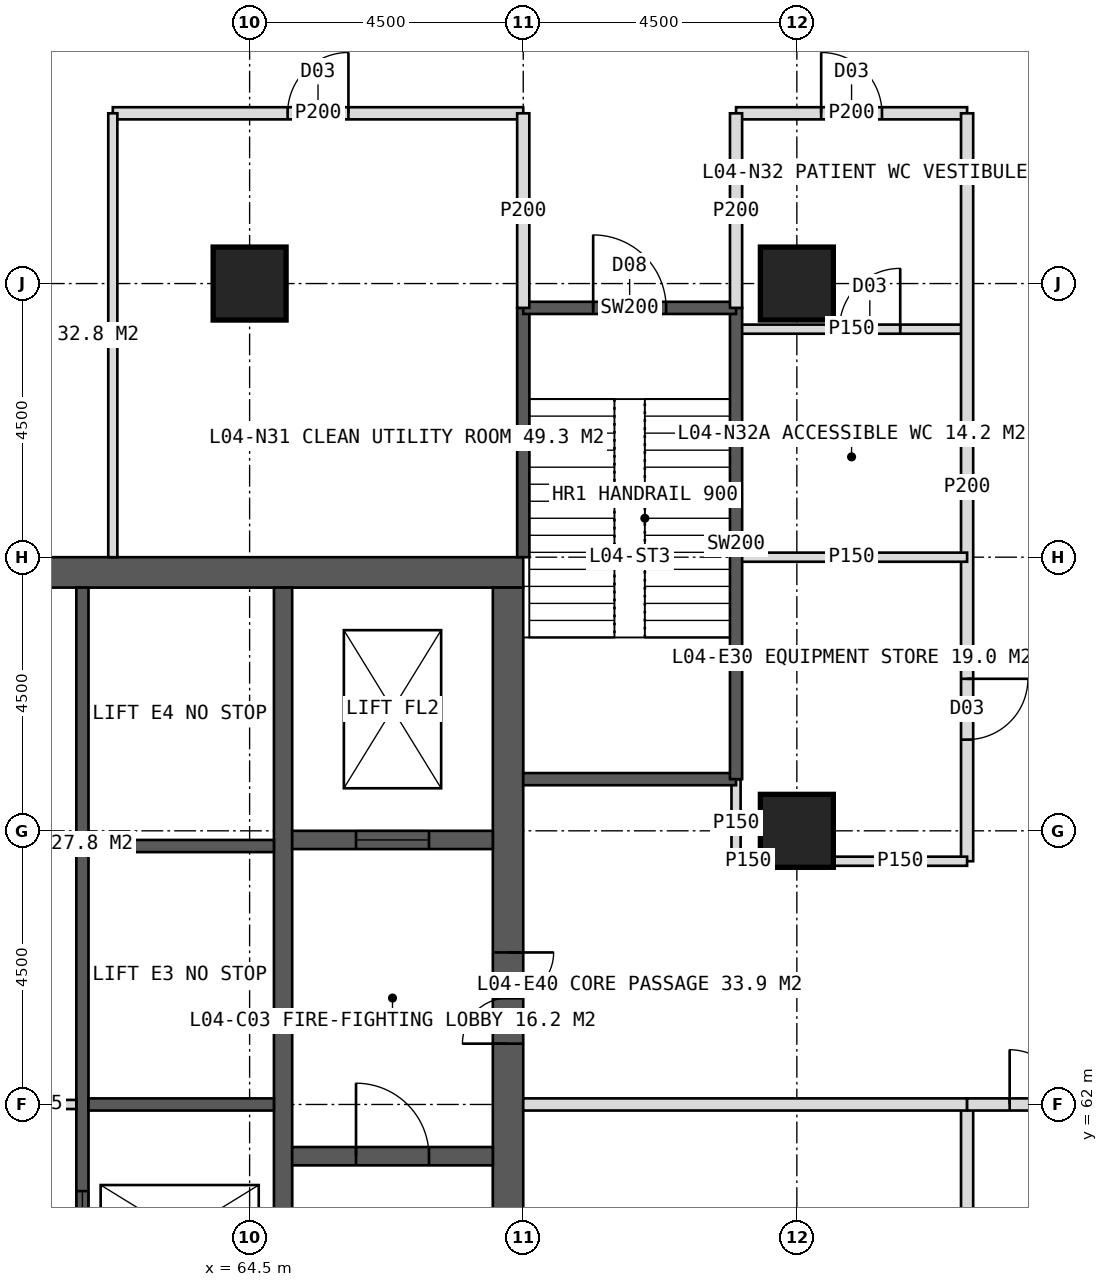
"""IFC4 building model, lengths in metres.
Left out: names, types, materials, properties, quantities, classifications, styles, units other than length and angle.
Written with IfcOpenShell. Run it as: python <this file> out.ifc"""

import sys

from ifc_helpers import new_model, si_unit, direction, frame, frame_2d, origin, origin_2d, place, context, subcontext, project, spatial, rectangle, hollow_rectangle, extrude, element, fill, save


model = new_model("IFC4")
c1 = context("Model", 3, precision=1e-05, world=origin(), true_north=direction((0.0, 1.0)))
c2 = subcontext(c1, "Body", "Model", "MODEL_VIEW")
j1 = project(units=[si_unit("LENGTHUNIT", "METRE"), si_unit("PLANEANGLEUNIT", "RADIAN")], contexts=[c1])
p1 = place(None, origin())
s1 = spatial("IfcSite", under=j1, at=p1, CompositionType="ELEMENT")
p2 = place(p1, origin())
s2 = spatial("IfcBuilding", under=s1, at=p2, CompositionType="ELEMENT")
p3 = place(p2, frame((0.0, 0.0, 21.0)))
s3 = spatial("IfcBuildingStorey", under=s2, at=p3, CompositionType="ELEMENT", Elevation=21.0)
p4 = place(p3, frame((51.0, 70.75, 0.0), z_axis=(0.0, 0.0, 1.0), x_axis=(1.0, 0.0, 0.0)))
e1 = element("IfcWall", 1, at=p4, inside=s3, PredefinedType="SHEAR", context=c2, shape_type="SweptSolid", body=[
    extrude(rectangle(XDim=18.0, YDim=0.5, at=frame_2d((9.0, 0.0))), origin(), (0.0, 0.0, 1.0), 5.0),
])
p5 = place(p4, frame((8.1, 0.0, 0.0)))
e2 = element("IfcOpeningElement", 2, at=p5, cuts=e1, PredefinedType="OPENING", context=c2, shape_type="SweptSolid", body=[
    extrude(rectangle(XDim=1.8, YDim=2.2, at=frame_2d((0.9, 1.1))), frame((0.0, 0.26, 0.0), z_axis=(0.0, -1.0, 0.0), x_axis=(1.0, 0.0, 0.0)), (0.0, 0.0, 1.0), 0.52),
])
p6 = place(p3, frame((68.75, 53.5, 0.0), z_axis=(0.0, 0.0, 1.0), x_axis=(0.0, 1.0, 0.0)))
e3 = element("IfcWall", 3, at=p6, inside=s3, PredefinedType="SHEAR", context=c2, shape_type="SweptSolid", body=[
    extrude(rectangle(XDim=17.0, YDim=0.5, at=frame_2d((8.5, 0.0))), origin(), (0.0, 0.0, 1.0), 5.0),
])
p7 = place(p6, frame((9.5, 0.0, 0.0)))
e4 = element("IfcOpeningElement", 4, at=p7, cuts=e3, PredefinedType="OPENING", context=c2, shape_type="SweptSolid", body=[
    extrude(rectangle(XDim=1.5, YDim=2.2, at=frame_2d((0.75, 1.1))), frame((0.0, 0.26, 0.0), z_axis=(0.0, -1.0, 0.0), x_axis=(1.0, 0.0, 0.0)), (0.0, 0.0, 1.0), 0.52),
])
p8 = place(p3, frame((65.05, 53.5, 0.0), z_axis=(0.0, 0.0, 1.0), x_axis=(0.0, 1.0, 0.0)))
e5 = element("IfcWall", 5, at=p8, inside=s3, PredefinedType="SHEAR", context=c2, shape_type="SweptSolid", body=[
    extrude(rectangle(XDim=17.0, YDim=0.3, at=frame_2d((8.5, 0.0))), origin(), (0.0, 0.0, 1.0), 5.0),
])
p9 = place(p3, frame((61.75, 53.5, 0.0), z_axis=(0.0, 0.0, 1.0), x_axis=(0.0, 1.0, 0.0)))
e6 = element("IfcWall", 6, at=p9, inside=s3, PredefinedType="SHEAR", context=c2, shape_type="SweptSolid", body=[
    extrude(rectangle(XDim=17.0, YDim=0.2, at=frame_2d((8.5, 0.0))), origin(), (0.0, 0.0, 1.0), 5.0),
])
p10 = place(p9, frame((1.375, 0.0, 0.0)))
e7 = element("IfcOpeningElement", 7, at=p10, cuts=e6, PredefinedType="OPENING", context=c2, shape_type="SweptSolid", body=[
    extrude(rectangle(XDim=1.4, YDim=2.2, at=frame_2d((0.7, 1.1))), frame((0.0, 0.11, 0.0), z_axis=(0.0, -1.0, 0.0), x_axis=(1.0, 0.0, 0.0)), (0.0, 0.0, 1.0), 0.22),
])
p11 = place(p9, frame((5.675, 0.0, 0.0)))
e8 = element("IfcOpeningElement", 8, at=p11, cuts=e6, PredefinedType="OPENING", context=c2, shape_type="SweptSolid", body=[
    extrude(rectangle(XDim=1.4, YDim=2.2, at=frame_2d((0.7, 1.1))), frame((0.0, 0.11, 0.0), z_axis=(0.0, -1.0, 0.0), x_axis=(1.0, 0.0, 0.0)), (0.0, 0.0, 1.0), 0.22),
])
for number, where, z_axis, x_axis in (
    (9, (61.85, 62.0, 0.0), (0.0, 0.0, 1.0), (1.0, 0.0, 0.0)),
    (10, (61.85, 66.25, 0.0), (0.0, 0.0, 1.0), (1.0, 0.0, 0.0)),
):
    element("IfcWall", number, at=place(p3, frame(where, z_axis=z_axis, x_axis=x_axis)), inside=s3, PredefinedType="SHEAR", context=c2, shape_type="SweptSolid", body=[
        extrude(rectangle(XDim=3.05, YDim=0.2, at=frame_2d((1.525, 0.0))), origin(), (0.0, 0.0, 1.0), 5.0),
    ])
p12 = place(p3, frame((65.2, 61.15, 0.0), z_axis=(0.0, 0.0, 1.0), x_axis=(1.0, 0.0, 0.0)))
e11 = element("IfcWall", 11, at=p12, inside=s3, PredefinedType="SHEAR", context=c2, shape_type="SweptSolid", body=[
    extrude(rectangle(XDim=3.3, YDim=0.3, at=frame_2d((1.65, 0.0))), origin(), (0.0, 0.0, 1.0), 5.0),
])
p13 = place(p12, frame((1.05, 0.0, 0.0)))
e12 = element("IfcOpeningElement", 12, at=p13, cuts=e11, PredefinedType="OPENING", context=c2, shape_type="SweptSolid", body=[
    extrude(rectangle(XDim=1.2, YDim=2.1, at=frame_2d((0.6, 1.05))), frame((0.0, 0.16, 0.0), z_axis=(0.0, -1.0, 0.0), x_axis=(1.0, 0.0, 0.0)), (0.0, 0.0, 1.0), 0.32),
])
p14 = place(p3, frame((65.2, 66.35, 0.0), z_axis=(0.0, 0.0, 1.0), x_axis=(1.0, 0.0, 0.0)))
e13 = element("IfcWall", 13, at=p14, inside=s3, PredefinedType="SHEAR", context=c2, shape_type="SweptSolid", body=[
    extrude(rectangle(XDim=3.3, YDim=0.3, at=frame_2d((1.65, 0.0))), origin(), (0.0, 0.0, 1.0), 5.0),
])
p15 = place(p14, frame((1.05, 0.0, 0.0)))
e14 = element("IfcOpeningElement", 14, at=p15, cuts=e13, PredefinedType="OPENING", context=c2, shape_type="SweptSolid", body=[
    extrude(rectangle(XDim=1.2, YDim=2.2, at=frame_2d((0.6, 1.1))), frame((0.0, 0.16, 0.0), z_axis=(0.0, -1.0, 0.0), x_axis=(1.0, 0.0, 0.0)), (0.0, 0.0, 1.0), 0.32),
])
for number, where, z_axis, x_axis in (
    (15, (73.5, 75.5, 0.0), (0.0, 0.0, 1.0), (1.0, 0.0, 0.0)),
    (16, (64.5, 75.5, 0.0), (0.0, 0.0, 1.0), (1.0, 0.0, 0.0)),
    (17, (73.5, 66.5, 0.0), (0.0, 0.0, 1.0), (1.0, 0.0, 0.0)),
):
    element("IfcColumn", number, at=place(p3, frame(where, z_axis=z_axis, x_axis=x_axis)), inside=s3, PredefinedType="COLUMN", context=c2, shape_type="SweptSolid", body=[
        extrude(hollow_rectangle(XDim=1.2, YDim=1.2, WallThickness=0.1, at=origin_2d()), origin(), (0.0, 0.0, 1.0), 5.0),
    ])
p16 = place(p3, frame((62.25, 78.3, 0.0), z_axis=(0.0, 0.0, 1.0), x_axis=(1.0, 0.0, 0.0)))
e18 = element("IfcWall", 18, at=p16, inside=s3, PredefinedType="PARTITIONING", context=c2, shape_type="SweptSolid", body=[
    extrude(rectangle(XDim=6.75, YDim=0.2, at=frame_2d((3.375, 0.0))), origin(), (0.0, 0.0, 1.0), 4.7),
])
p17 = place(p16, frame((2.875, 0.0, 0.0)))
e19 = element("IfcOpeningElement", 19, at=p17, cuts=e18, PredefinedType="OPENING", context=c2, shape_type="SweptSolid", body=[
    extrude(rectangle(XDim=1.0, YDim=2.1, at=frame_2d((0.5, 1.05))), frame((0.0, 0.11, 0.0), z_axis=(0.0, -1.0, 0.0), x_axis=(1.0, 0.0, 0.0)), (0.0, 0.0, 1.0), 0.22),
])
p18 = place(p3, frame((72.5, 78.3, 0.0), z_axis=(0.0, 0.0, 1.0), x_axis=(1.0, 0.0, 0.0)))
e20 = element("IfcWall", 20, at=p18, inside=s3, PredefinedType="PARTITIONING", context=c2, shape_type="SweptSolid", body=[
    extrude(rectangle(XDim=3.8, YDim=0.2, at=frame_2d((1.9, 0.0))), origin(), (0.0, 0.0, 1.0), 4.7),
])
p19 = place(p18, frame((1.4, 0.0, 0.0)))
e21 = element("IfcOpeningElement", 21, at=p19, cuts=e20, PredefinedType="OPENING", context=c2, shape_type="SweptSolid", body=[
    extrude(rectangle(XDim=1.0, YDim=2.1, at=frame_2d((0.5, 1.05))), frame((0.0, 0.11, 0.0), z_axis=(0.0, -1.0, 0.0), x_axis=(1.0, 0.0, 0.0)), (0.0, 0.0, 1.0), 0.22),
])
p20 = place(p3, frame((62.25, 71.0, 0.0), z_axis=(0.0, 0.0, 1.0), x_axis=(0.0, 1.0, 0.0)))
e22 = element("IfcWall", 22, at=p20, inside=s3, PredefinedType="PARTITIONING", context=c2, shape_type="SweptSolid", body=[
    extrude(rectangle(XDim=7.3, YDim=0.15, at=frame_2d((3.65, 0.0))), origin(), (0.0, 0.0, 1.0), 4.7),
])
p21 = place(p3, frame((72.5, 74.75, 0.0), z_axis=(0.0, 0.0, 1.0), x_axis=(1.0, 0.0, 0.0)))
e23 = element("IfcWall", 23, at=p21, inside=s3, PredefinedType="PARTITIONING", context=c2, shape_type="SweptSolid", body=[
    extrude(rectangle(XDim=3.8, YDim=0.15, at=frame_2d((1.9, 0.0))), origin(), (0.0, 0.0, 1.0), 4.7),
])
p22 = place(p21, frame((1.7, 0.0, 0.0)))
e24 = element("IfcOpeningElement", 24, at=p22, cuts=e23, PredefinedType="OPENING", context=c2, shape_type="SweptSolid", body=[
    extrude(rectangle(XDim=1.0, YDim=2.1, at=frame_2d((0.5, 1.05))), frame((0.0, 0.085, 0.0), z_axis=(0.0, -1.0, 0.0), x_axis=(1.0, 0.0, 0.0)), (0.0, 0.0, 1.0), 0.17),
])
p23 = place(p3, frame((76.3, 78.3, 0.0), z_axis=(0.0, 0.0, 1.0), x_axis=(0.0, -1.0, 0.0)))
e25 = element("IfcWall", 25, at=p23, inside=s3, PredefinedType="PARTITIONING", context=c2, shape_type="SweptSolid", body=[
    extrude(rectangle(XDim=12.3, YDim=0.2, at=frame_2d((6.15, 0.0))), origin(), (0.0, 0.0, 1.0), 4.7),
])
p24 = place(p23, frame((9.3, 0.0, 0.0)))
e26 = element("IfcOpeningElement", 26, at=p24, cuts=e25, PredefinedType="OPENING", context=c2, shape_type="SweptSolid", body=[
    extrude(rectangle(XDim=1.0, YDim=2.1, at=frame_2d((0.5, 1.05))), frame((0.0, 0.11, 0.0), z_axis=(0.0, -1.0, 0.0), x_axis=(1.0, 0.0, 0.0)), (0.0, 0.0, 1.0), 0.22),
])
p25 = place(p3, frame((76.3, 62.0, 0.0), z_axis=(0.0, 0.0, 1.0), x_axis=(0.0, -1.0, 0.0)))
e27 = element("IfcWall", 27, at=p25, inside=s3, PredefinedType="PARTITIONING", context=c2, shape_type="SweptSolid", body=[
    extrude(rectangle(XDim=16.3, YDim=0.2, at=frame_2d((8.15, 0.0))), origin(), (0.0, 0.0, 1.0), 4.7),
])
p26 = place(p25, frame((4.0, 0.0, 0.0)))
e28 = element("IfcOpeningElement", 28, at=p26, cuts=e27, PredefinedType="OPENING", context=c2, shape_type="SweptSolid", body=[
    extrude(rectangle(XDim=1.0, YDim=2.1, at=frame_2d((0.5, 1.05))), frame((0.0, 0.11, 0.0), z_axis=(0.0, -1.0, 0.0), x_axis=(1.0, 0.0, 0.0)), (0.0, 0.0, 1.0), 0.22),
])
p27 = place(p25, frame((9.75, 0.0, 0.0)))
e29 = element("IfcOpeningElement", 29, at=p27, cuts=e27, PredefinedType="OPENING", context=c2, shape_type="SweptSolid", body=[
    extrude(rectangle(XDim=0.9, YDim=2.1, at=frame_2d((0.45, 1.05))), frame((0.0, 0.11, 0.0), z_axis=(0.0, -1.0, 0.0), x_axis=(1.0, 0.0, 0.0)), (0.0, 0.0, 1.0), 0.22),
])
p28 = place(p25, frame((13.35, 0.0, 0.0)))
e30 = element("IfcOpeningElement", 30, at=p28, cuts=e27, PredefinedType="OPENING", context=c2, shape_type="SweptSolid", body=[
    extrude(rectangle(XDim=1.0, YDim=2.1, at=frame_2d((0.5, 1.05))), frame((0.0, 0.11, 0.0), z_axis=(0.0, -1.0, 0.0), x_axis=(1.0, 0.0, 0.0)), (0.0, 0.0, 1.0), 0.22),
])
p29 = place(p3, frame((72.5, 71.0, 0.0), z_axis=(0.0, 0.0, 1.0), x_axis=(1.0, 0.0, 0.0)))
e31 = element("IfcWall", 31, at=p29, inside=s3, PredefinedType="PARTITIONING", context=c2, shape_type="SweptSolid", body=[
    extrude(rectangle(XDim=3.8, YDim=0.15, at=frame_2d((1.9, 0.0))), origin(), (0.0, 0.0, 1.0), 4.7),
])
p30 = place(p3, frame((72.5, 66.0, 0.0), z_axis=(0.0, 0.0, 1.0), x_axis=(1.0, 0.0, 0.0)))
e32 = element("IfcWall", 32, at=p30, inside=s3, PredefinedType="PARTITIONING", context=c2, shape_type="SweptSolid", body=[
    extrude(rectangle(XDim=0.4, YDim=0.15, at=frame_2d((0.2, 0.0))), origin(), (0.0, 0.0, 1.0), 4.7),
])
p31 = place(p3, frame((74.1, 66.0, 0.0), z_axis=(0.0, 0.0, 1.0), x_axis=(1.0, 0.0, 0.0)))
e33 = element("IfcWall", 33, at=p31, inside=s3, PredefinedType="PARTITIONING", context=c2, shape_type="SweptSolid", body=[
    extrude(rectangle(XDim=2.2, YDim=0.15, at=frame_2d((1.1, 0.0))), origin(), (0.0, 0.0, 1.0), 4.7),
])
p32 = place(p3, frame((69.0, 62.0, 0.0), z_axis=(0.0, 0.0, 1.0), x_axis=(1.0, 0.0, 0.0)))
e34 = element("IfcWall", 34, at=p32, inside=s3, PredefinedType="SOLIDWALL", context=c2, shape_type="SweptSolid", body=[
    extrude(rectangle(XDim=7.3, YDim=0.2, at=frame_2d((3.65, 0.0))), origin(), (0.0, 0.0, 1.0), 3.7),
])
p33 = place(p3, frame((76.3, 62.0, 0.0), z_axis=(0.0, 0.0, 1.0), x_axis=(1.0, 0.0, 0.0)))
e35 = element("IfcWall", 35, at=p33, inside=s3, PredefinedType="SOLIDWALL", context=c2, shape_type="SweptSolid", body=[
    extrude(rectangle(XDim=3.2, YDim=0.2, at=frame_2d((1.6, 0.0))), origin(), (0.0, 0.0, 1.0), 3.7),
])
p34 = place(p33, frame((0.7, 0.0, 0.0)))
e36 = element("IfcOpeningElement", 36, at=p34, cuts=e35, PredefinedType="OPENING", context=c2, shape_type="SweptSolid", body=[
    extrude(rectangle(XDim=1.8, YDim=2.2, at=frame_2d((0.9, 1.1))), frame((0.0, 0.11, 0.0), z_axis=(0.0, -1.0, 0.0), x_axis=(1.0, 0.0, 0.0)), (0.0, 0.0, 1.0), 0.22),
])
p35 = place(p3, frame((58.35, 62.0, 0.0), z_axis=(0.0, 0.0, 1.0), x_axis=(1.0, 0.0, 0.0)))
e37 = element("IfcWall", 37, at=p35, inside=s3, PredefinedType="PARTITIONING", context=c2, shape_type="SweptSolid", body=[
    extrude(rectangle(XDim=3.3, YDim=0.15, at=frame_2d((1.65, 0.0))), origin(), (0.0, 0.0, 1.0), 4.7),
])
p36 = place(p35, frame((1.15, 0.0, 0.0)))
e38 = element("IfcOpeningElement", 38, at=p36, cuts=e37, PredefinedType="OPENING", context=c2, shape_type="SweptSolid", body=[
    extrude(rectangle(XDim=1.0, YDim=2.1, at=frame_2d((0.5, 1.05))), frame((0.0, 0.085, 0.0), z_axis=(0.0, -1.0, 0.0), x_axis=(1.0, 0.0, 0.0)), (0.0, 0.0, 1.0), 0.17),
])
p37 = place(p3, frame((72.5, 65.9, 0.0), z_axis=(0.0, 0.0, 1.0), x_axis=(0.0, 1.0, 0.0)))
e39 = element("IfcWall", 39, at=p37, inside=s3, PredefinedType="PARTITIONING", context=c2, shape_type="SweptSolid", body=[
    extrude(rectangle(XDim=1.45, YDim=0.15, at=frame_2d((0.725, 0.0))), origin(), (0.0, 0.0, 1.0), 4.7),
])
p38 = place(p3, frame((69.0, 71.0, 0.0), z_axis=(0.0, 0.0, 1.0), x_axis=(0.0, 1.0, 0.0)))
e40 = element("IfcWall", 40, at=p38, inside=s3, PredefinedType="SOLIDWALL", context=c2, shape_type="SweptSolid", body=[
    extrude(rectangle(XDim=4.1, YDim=0.2, at=frame_2d((2.05, 0.0))), origin(), (0.0, 0.0, 1.0), 4.7),
])
p39 = place(p3, frame((69.0, 67.35, 0.0), z_axis=(0.0, 0.0, 1.0), x_axis=(1.0, 0.0, 0.0)))
e41 = element("IfcWall", 41, at=p39, inside=s3, PredefinedType="SOLIDWALL", context=c2, shape_type="SweptSolid", body=[
    extrude(rectangle(XDim=3.5, YDim=0.2, at=frame_2d((1.75, 0.0))), origin(), (0.0, 0.0, 1.0), 4.7),
])
p40 = place(p3, frame((72.5, 67.35, 0.0), z_axis=(0.0, 0.0, 1.0), x_axis=(0.0, 1.0, 0.0)))
e42 = element("IfcWall", 42, at=p40, inside=s3, PredefinedType="SOLIDWALL", context=c2, shape_type="SweptSolid", body=[
    extrude(rectangle(XDim=7.75, YDim=0.2, at=frame_2d((3.875, 0.0))), origin(), (0.0, 0.0, 1.0), 4.7),
])
p41 = place(p3, frame((69.0, 75.1, 0.0), z_axis=(0.0, 0.0, 1.0), x_axis=(1.0, 0.0, 0.0)))
e43 = element("IfcWall", 43, at=p41, inside=s3, PredefinedType="SOLIDWALL", context=c2, shape_type="SweptSolid", body=[
    extrude(rectangle(XDim=3.5, YDim=0.2, at=frame_2d((1.75, 0.0))), origin(), (0.0, 0.0, 1.0), 4.7),
])
p42 = place(p41, frame((1.15, 0.0, 0.0)))
e44 = element("IfcOpeningElement", 44, at=p42, cuts=e43, PredefinedType="OPENING", context=c2, shape_type="SweptSolid", body=[
    extrude(rectangle(XDim=1.2, YDim=2.1, at=frame_2d((0.6, 1.05))), frame((0.0, 0.11, 0.0), z_axis=(0.0, -1.0, 0.0), x_axis=(1.0, 0.0, 0.0)), (0.0, 0.0, 1.0), 0.22),
])
for number, where, z_axis, x_axis in (
    (45, (69.0, 75.1, 0.0), (0.0, 0.0, 1.0), (0.0, 1.0, 0.0)),
    (46, (72.5, 75.1, 0.0), (0.0, 0.0, 1.0), (0.0, 1.0, 0.0)),
):
    element("IfcWall", number, at=place(p3, frame(where, z_axis=z_axis, x_axis=x_axis)), inside=s3, PredefinedType="PARTITIONING", context=c2, shape_type="SweptSolid", body=[
        extrude(rectangle(XDim=3.2, YDim=0.2, at=frame_2d((1.6, 0.0))), origin(), (0.0, 0.0, 1.0), 4.7),
    ])
p43 = place(p17, origin())
e47 = element("IfcDoor", 47, at=p43, inside=s3, OperationType="SINGLE_SWING_RIGHT", PredefinedType="DOOR", context=c2, shape_type="SweptSolid", body=[
    extrude(rectangle(XDim=1.0, YDim=2.1, at=frame_2d((0.5, 1.05))), frame((0.0, 0.025, 0.0), z_axis=(0.0, -1.0, 0.0), x_axis=(1.0, 0.0, 0.0)), (0.0, 0.0, 1.0), 0.05),
])
fill(e19, e47)
p44 = place(p19, origin())
e48 = element("IfcDoor", 48, at=p44, inside=s3, OperationType="SINGLE_SWING_LEFT", PredefinedType="DOOR", context=c2, shape_type="SweptSolid", body=[
    extrude(rectangle(XDim=1.0, YDim=2.1, at=frame_2d((0.5, 1.05))), frame((0.0, 0.025, 0.0), z_axis=(0.0, -1.0, 0.0), x_axis=(1.0, 0.0, 0.0)), (0.0, 0.0, 1.0), 0.05),
])
fill(e21, e48)
p45 = place(p24, origin())
e49 = element("IfcDoor", 49, at=p45, inside=s3, OperationType="SINGLE_SWING_LEFT", PredefinedType="DOOR", context=c2, shape_type="SweptSolid", body=[
    extrude(rectangle(XDim=1.0, YDim=2.1, at=frame_2d((0.5, 1.05))), frame((0.0, 0.025, 0.0), z_axis=(0.0, -1.0, 0.0), x_axis=(1.0, 0.0, 0.0)), (0.0, 0.0, 1.0), 0.05),
])
fill(e26, e49)
p46 = place(p34, origin())
e50 = element("IfcDoor", 50, at=p46, inside=s3, OperationType="DOUBLE_DOOR_DOUBLE_SWING", PredefinedType="DOOR", context=c2, shape_type="SweptSolid", body=[
    extrude(rectangle(XDim=1.8, YDim=2.2, at=frame_2d((0.9, 1.1))), frame((0.0, 0.025, 0.0), z_axis=(0.0, -1.0, 0.0), x_axis=(1.0, 0.0, 0.0)), (0.0, 0.0, 1.0), 0.05),
])
fill(e36, e50)
p47 = place(p7, origin())
e51 = element("IfcDoor", 51, at=p47, inside=s3, OperationType="DOUBLE_DOOR_SINGLE_SWING", PredefinedType="DOOR", context=c2, shape_type="SweptSolid", body=[
    extrude(rectangle(XDim=1.5, YDim=2.2, at=frame_2d((0.75, 1.1))), frame((0.0, 0.025, 0.0), z_axis=(0.0, -1.0, 0.0), x_axis=(1.0, 0.0, 0.0)), (0.0, 0.0, 1.0), 0.05),
])
fill(e4, e51)
p48 = place(p13, origin())
e52 = element("IfcDoor", 52, at=p48, inside=s3, OperationType="SINGLE_SWING_LEFT", PredefinedType="DOOR", context=c2, shape_type="SweptSolid", body=[
    extrude(rectangle(XDim=1.2, YDim=2.1, at=frame_2d((0.6, 1.05))), frame((0.0, 0.025, 0.0), z_axis=(0.0, -1.0, 0.0), x_axis=(1.0, 0.0, 0.0)), (0.0, 0.0, 1.0), 0.05),
])
fill(e12, e52)
p49 = place(p15, origin())
e53 = element("IfcDoor", 53, at=p49, inside=s3, OperationType="SLIDING_TO_LEFT", PredefinedType="DOOR", context=c2, shape_type="SweptSolid", body=[
    extrude(rectangle(XDim=1.2, YDim=2.2, at=frame_2d((0.6, 1.1))), frame((0.0, 0.025, 0.0), z_axis=(0.0, -1.0, 0.0), x_axis=(1.0, 0.0, 0.0)), (0.0, 0.0, 1.0), 0.05),
])
fill(e14, e53)
p50 = place(p11, origin())
e54 = element("IfcDoor", 54, at=p50, inside=s3, OperationType="SLIDING_TO_LEFT", PredefinedType="DOOR", context=c2, shape_type="SweptSolid", body=[
    extrude(rectangle(XDim=1.4, YDim=2.2, at=frame_2d((0.7, 1.1))), frame((0.0, 0.025, 0.0), z_axis=(0.0, -1.0, 0.0), x_axis=(1.0, 0.0, 0.0)), (0.0, 0.0, 1.0), 0.05),
])
fill(e8, e54)
p51 = place(p22, origin())
e55 = element("IfcDoor", 55, at=p51, inside=s3, OperationType="SINGLE_SWING_RIGHT", PredefinedType="DOOR", context=c2, shape_type="SweptSolid", body=[
    extrude(rectangle(XDim=1.0, YDim=2.1, at=frame_2d((0.5, 1.05))), frame((0.0, 0.025, 0.0), z_axis=(0.0, -1.0, 0.0), x_axis=(1.0, 0.0, 0.0)), (0.0, 0.0, 1.0), 0.05),
])
fill(e24, e55)
p52 = place(p42, origin())
e56 = element("IfcDoor", 56, at=p52, inside=s3, OperationType="SINGLE_SWING_LEFT", PredefinedType="DOOR", context=c2, shape_type="SweptSolid", body=[
    extrude(rectangle(XDim=1.2, YDim=2.1, at=frame_2d((0.6, 1.05))), frame((0.0, 0.025, 0.0), z_axis=(0.0, -1.0, 0.0), x_axis=(1.0, 0.0, 0.0)), (0.0, 0.0, 1.0), 0.05),
])
fill(e44, e56)
save(model, sys.argv[1])
